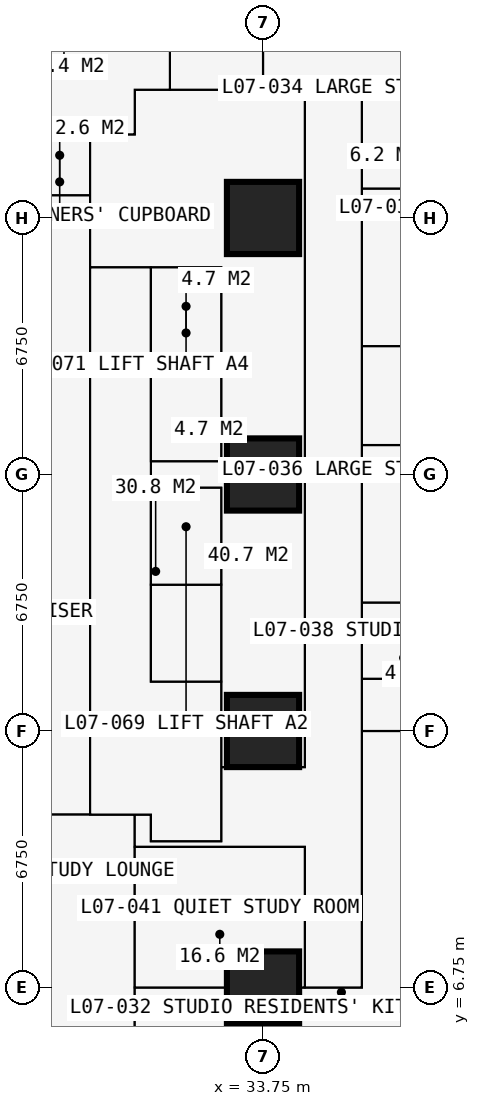
"""IFC4 building model, lengths in metres.
Left out: names, types, materials, properties, quantities, classifications, styles, units other than length and angle.
Written with IfcOpenShell. Run it as: python <this file> out.ifc"""

import sys

from ifc_helpers import new_model, si_unit, direction, frame, frame_2d, origin, origin_2d, place, context, subcontext, project, spatial, rectangle, extrude, element, fill, save


model = new_model("IFC4")
c1 = context("Model", 3, precision=1e-05, world=origin(), true_north=direction((0.0, 1.0)))
c2 = subcontext(c1, "Body", "Model", "MODEL_VIEW")
j1 = project(units=[si_unit("LENGTHUNIT", "METRE"), si_unit("PLANEANGLEUNIT", "RADIAN")], contexts=[c1])
p1 = place(None, origin())
s1 = spatial("IfcSite", under=j1, at=p1, CompositionType="ELEMENT")
p2 = place(p1, origin())
s2 = spatial("IfcBuilding", under=s1, at=p2, CompositionType="ELEMENT")
p3 = place(p2, frame((0.0, 0.0, 28.8)))
s3 = spatial("IfcBuildingStorey", under=s2, at=p3, CompositionType="ELEMENT", Elevation=28.8)
for number, where, z_axis, x_axis in (
    (1, (33.75, 6.75, 0.0), (0.0, 0.0, 1.0), (1.0, 0.0, 0.0)),
    (2, (33.75, 13.5, 0.0), (0.0, 0.0, 1.0), (1.0, 0.0, 0.0)),
    (3, (33.75, 20.25, 0.0), (0.0, 0.0, 1.0), (1.0, 0.0, 0.0)),
    (4, (33.75, 27.0, 0.0), (0.0, 0.0, 1.0), (1.0, 0.0, 0.0)),
):
    element("IfcColumn", number, at=place(p3, frame(where, z_axis=z_axis, x_axis=x_axis)), inside=s3, PredefinedType="COLUMN", context=c2, shape_type="SweptSolid", body=[
        extrude(rectangle(XDim=1.9, YDim=1.9, at=origin_2d()), origin(), (0.0, 0.0, 1.0), 3.6),
    ])
p4 = place(p3, frame((10.125, 11.3, 0.0), z_axis=(0.0, 0.0, 1.0), x_axis=(1.0, 0.0, 0.0)))
e5 = element("IfcWall", 5, at=p4, inside=s3, PredefinedType="PARTITIONING", context=c2, shape_type="SweptSolid", body=[
    extrude(rectangle(XDim=20.675, YDim=0.15, at=frame_2d((10.337, 0.0))), origin(), (0.0, 0.0, 1.0), 3.375),
])
p5 = place(p4, frame((1.775, 0.0, 0.0)))
e6 = element("IfcOpeningElement", 6, at=p5, cuts=e5, PredefinedType="OPENING", context=c2, shape_type="SweptSolid", body=[
    extrude(rectangle(XDim=1.0, YDim=2.2, at=frame_2d((0.5, 1.1))), frame((0.0, 0.085, 0.0), z_axis=(0.0, -1.0, 0.0), x_axis=(1.0, 0.0, 0.0)), (0.0, 0.0, 1.0), 0.17),
])
p6 = place(p4, frame((11.312, 0.0, 0.0)))
e7 = element("IfcOpeningElement", 7, at=p6, cuts=e5, PredefinedType="OPENING", context=c2, shape_type="SweptSolid", body=[
    extrude(rectangle(XDim=1.0, YDim=2.2, at=frame_2d((0.5, 1.1))), frame((0.0, 0.085, 0.0), z_axis=(0.0, -1.0, 0.0), x_axis=(1.0, 0.0, 0.0)), (0.0, 0.0, 1.0), 0.17),
])
p7 = place(p3, frame((11.3, 29.2, 0.0), z_axis=(0.0, 0.0, 1.0), x_axis=(1.0, 0.0, 0.0)))
e8 = element("IfcWall", 8, at=p7, inside=s3, PredefinedType="PARTITIONING", context=c2, shape_type="SweptSolid", body=[
    extrude(rectangle(XDim=19.075, YDim=0.15, at=frame_2d((9.538, 0.0))), origin(), (0.0, 0.0, 1.0), 3.375),
])
p8 = place(p7, frame((12.875, 0.0, 0.0)))
e9 = element("IfcOpeningElement", 9, at=p8, cuts=e8, PredefinedType="OPENING", context=c2, shape_type="SweptSolid", body=[
    extrude(rectangle(XDim=1.0, YDim=2.2, at=frame_2d((0.5, 1.1))), frame((0.0, 0.085, 0.0), z_axis=(0.0, -1.0, 0.0), x_axis=(1.0, 0.0, 0.0)), (0.0, 0.0, 1.0), 0.17),
])
p9 = place(p7, frame((10.438, 0.0, 0.0)))
e10 = element("IfcOpeningElement", 10, at=p9, cuts=e8, PredefinedType="OPENING", context=c2, shape_type="SweptSolid", body=[
    extrude(rectangle(XDim=1.0, YDim=2.2, at=frame_2d((0.5, 1.1))), frame((0.0, 0.085, 0.0), z_axis=(0.0, -1.0, 0.0), x_axis=(1.0, 0.0, 0.0)), (0.0, 0.0, 1.0), 0.17),
])
p10 = place(p7, frame((14.875, 0.0, 0.0)))
e11 = element("IfcOpeningElement", 11, at=p10, cuts=e8, PredefinedType="OPENING", context=c2, shape_type="SweptSolid", body=[
    extrude(rectangle(XDim=0.95, YDim=2.2, at=frame_2d((0.475, 1.1))), frame((0.0, 0.085, 0.0), z_axis=(0.0, -1.0, 0.0), x_axis=(1.0, 0.0, 0.0)), (0.0, 0.0, 1.0), 0.17),
])
p11 = place(p3, frame((27.6, 27.6, 0.0), z_axis=(0.0, 0.0, 1.0), x_axis=(1.0, 0.0, 0.0)))
e12 = element("IfcWall", 12, at=p11, inside=s3, PredefinedType="PARTITIONING", context=c2, shape_type="SweptSolid", body=[
    extrude(rectangle(XDim=1.6, YDim=0.15, at=frame_2d((0.8, 0.0))), origin(), (0.0, 0.0, 1.0), 2.877),
])
p12 = place(p3, frame((29.2, 11.3, 0.0), z_axis=(0.0, 0.0, 1.0), x_axis=(0.0, 1.0, 0.0)))
e13 = element("IfcWall", 13, at=p12, inside=s3, PredefinedType="PARTITIONING", context=c2, shape_type="SweptSolid", body=[
    extrude(rectangle(XDim=17.9, YDim=0.2, at=frame_2d((8.95, 0.0))), origin(), (0.0, 0.0, 1.0), 3.375),
])
p13 = place(p12, frame((8.35, 0.0, 0.0)))
e14 = element("IfcOpeningElement", 14, at=p13, cuts=e13, PredefinedType="OPENING", context=c2, shape_type="SweptSolid", body=[
    extrude(rectangle(XDim=1.2, YDim=2.2, at=frame_2d((0.6, 1.1))), frame((0.0, 0.11, 0.0), z_axis=(0.0, -1.0, 0.0), x_axis=(1.0, 0.0, 0.0)), (0.0, 0.0, 1.0), 0.22),
])
p14 = place(p3, frame((29.2, 25.7, 0.0), z_axis=(0.0, 0.0, 1.0), x_axis=(1.0, 0.0, 0.0)))
e15 = element("IfcWall", 15, at=p14, inside=s3, PredefinedType="SHEAR", context=c2, shape_type="SweptSolid", body=[
    extrude(rectangle(XDim=3.45, YDim=0.1, at=frame_2d((1.725, 0.0))), origin(), (0.0, 0.0, 1.0), 3.375),
])
p15 = place(p3, frame((30.375, -0.734, 0.0), z_axis=(0.0, 0.0, 1.0), x_axis=(0.0, 1.0, 0.0)))
e16 = element("IfcWall", 16, at=p15, inside=s3, PredefinedType="PARTITIONING", context=c2, shape_type="SweptSolid", body=[
    extrude(rectangle(XDim=12.034, YDim=0.15, at=frame_2d((6.017, 0.0))), origin(), (0.0, 0.0, 1.0), 3.375),
])
p16 = place(p15, frame((5.134, 0.0, 0.0)))
e17 = element("IfcOpeningElement", 17, at=p16, cuts=e16, PredefinedType="OPENING", context=c2, shape_type="SweptSolid", body=[
    extrude(rectangle(XDim=1.0, YDim=2.2, at=frame_2d((0.5, 1.1))), frame((0.0, 0.085, 0.0), z_axis=(0.0, -1.0, 0.0), x_axis=(1.0, 0.0, 0.0)), (0.0, 0.0, 1.0), 0.17),
])
p17 = place(p3, frame((30.375, 6.75, 0.0), z_axis=(0.0, 0.0, 1.0), x_axis=(1.0, 0.0, 0.0)))
e18 = element("IfcWall", 18, at=p17, inside=s3, PredefinedType="PARTITIONING", context=c2, shape_type="SweptSolid", body=[
    extrude(rectangle(XDim=5.975, YDim=0.15, at=frame_2d((2.988, 0.0))), origin(), (0.0, 0.0, 1.0), 2.877),
])
p18 = place(p3, frame((30.375, 10.45, 0.0), z_axis=(0.0, 0.0, 1.0), x_axis=(1.0, 0.0, 0.0)))
e19 = element("IfcWall", 19, at=p18, inside=s3, PredefinedType="PARTITIONING", context=c2, shape_type="SweptSolid", body=[
    extrude(rectangle(XDim=4.475, YDim=0.15, at=frame_2d((2.238, 0.0))), origin(), (0.0, 0.0, 1.0), 3.375),
])
p19 = place(p18, frame((2.35, 0.0, 0.0)))
e20 = element("IfcOpeningElement", 20, at=p19, cuts=e19, PredefinedType="OPENING", context=c2, shape_type="SweptSolid", body=[
    extrude(rectangle(XDim=0.95, YDim=2.2, at=frame_2d((0.475, 1.1))), frame((0.0, 0.085, 0.0), z_axis=(0.0, -1.0, 0.0), x_axis=(1.0, 0.0, 0.0)), (0.0, 0.0, 1.0), 0.17),
])
p20 = place(p3, frame((30.375, 29.2, 0.0), z_axis=(0.0, 0.0, 1.0), x_axis=(0.0, 1.0, 0.0)))
e21 = element("IfcWall", 21, at=p20, inside=s3, PredefinedType="PARTITIONING", context=c2, shape_type="SweptSolid", body=[
    extrude(rectangle(XDim=1.175, YDim=0.15, at=frame_2d((0.587, 0.0))), origin(), (0.0, 0.0, 1.0), 3.375),
])
p21 = place(p3, frame((30.375, 30.375, 0.0), z_axis=(0.0, 0.0, 1.0), x_axis=(1.0, 0.0, 0.0)))
e22 = element("IfcWall", 22, at=p21, inside=s3, PredefinedType="PARTITIONING", context=c2, shape_type="SweptSolid", body=[
    extrude(rectangle(XDim=10.859, YDim=0.15, at=frame_2d((5.429, 0.0))), origin(), (0.0, 0.0, 1.0), 3.375),
])
p22 = place(p3, frame((30.8, 10.6, 0.0), z_axis=(0.0, 0.0, 1.0), x_axis=(0.0, 1.0, 0.0)))
e23 = element("IfcWall", 23, at=p22, inside=s3, PredefinedType="PARTITIONING", context=c2, shape_type="SweptSolid", body=[
    extrude(rectangle(XDim=0.7, YDim=0.15, at=frame_2d((0.35, 0.0))), origin(), (0.0, 0.0, 1.0), 3.375),
])
p23 = place(p3, frame((30.8, 10.6, 0.0), z_axis=(0.0, 0.0, 1.0), x_axis=(1.0, 0.0, 0.0)))
e24 = element("IfcWall", 24, at=p23, inside=s3, PredefinedType="PARTITIONING", context=c2, shape_type="SweptSolid", body=[
    extrude(rectangle(XDim=1.85, YDim=0.15, at=frame_2d((0.925, 0.0))), origin(), (0.0, 0.0, 1.0), 3.375),
])
p24 = place(p3, frame((30.8, 14.8, 0.0), z_axis=(0.0, 0.0, 1.0), x_axis=(0.0, 1.0, 0.0)))
e25 = element("IfcWall", 25, at=p24, inside=s3, PredefinedType="PARTITIONING", context=c2, shape_type="SweptSolid", body=[
    extrude(rectangle(XDim=10.9, YDim=0.15, at=frame_2d((5.45, 0.0))), origin(), (0.0, 0.0, 1.0), 3.375),
])
p25 = place(p24, frame((0.75, 0.0, 0.0)))
e26 = element("IfcOpeningElement", 26, at=p25, cuts=e25, PredefinedType="OPENING", context=c2, shape_type="SweptSolid", body=[
    extrude(rectangle(XDim=1.1, YDim=2.2, at=frame_2d((0.55, 1.1))), frame((0.0, 0.085, 0.0), z_axis=(0.0, -1.0, 0.0), x_axis=(1.0, 0.0, 0.0)), (0.0, 0.0, 1.0), 0.17),
])
p26 = place(p24, frame((3.25, 0.0, 0.0)))
e27 = element("IfcOpeningElement", 27, at=p26, cuts=e25, PredefinedType="OPENING", context=c2, shape_type="SweptSolid", body=[
    extrude(rectangle(XDim=1.1, YDim=2.2, at=frame_2d((0.55, 1.1))), frame((0.0, 0.085, 0.0), z_axis=(0.0, -1.0, 0.0), x_axis=(1.0, 0.0, 0.0)), (0.0, 0.0, 1.0), 0.17),
])
p27 = place(p24, frame((6.5, 0.0, 0.0)))
e28 = element("IfcOpeningElement", 28, at=p27, cuts=e25, PredefinedType="OPENING", context=c2, shape_type="SweptSolid", body=[
    extrude(rectangle(XDim=1.1, YDim=2.2, at=frame_2d((0.55, 1.1))), frame((0.0, 0.085, 0.0), z_axis=(0.0, -1.0, 0.0), x_axis=(1.0, 0.0, 0.0)), (0.0, 0.0, 1.0), 0.17),
])
p28 = place(p24, frame((9.05, 0.0, 0.0)))
e29 = element("IfcOpeningElement", 29, at=p28, cuts=e25, PredefinedType="OPENING", context=c2, shape_type="SweptSolid", body=[
    extrude(rectangle(XDim=1.1, YDim=2.2, at=frame_2d((0.55, 1.1))), frame((0.0, 0.085, 0.0), z_axis=(0.0, -1.0, 0.0), x_axis=(1.0, 0.0, 0.0)), (0.0, 0.0, 1.0), 0.17),
])
for number, where, z_axis, x_axis in (
    (30, (30.8, 14.8, 0.0), (0.0, 0.0, 1.0), (1.0, 0.0, 0.0)),
    (31, (30.8, 17.35, 0.0), (0.0, 0.0, 1.0), (1.0, 0.0, 0.0)),
    (32, (30.8, 19.9, 0.0), (0.0, 0.0, 1.0), (1.0, 0.0, 0.0)),
    (33, (30.8, 20.6, 0.0), (0.0, 0.0, 1.0), (1.0, 0.0, 0.0)),
    (34, (30.8, 23.15, 0.0), (0.0, 0.0, 1.0), (1.0, 0.0, 0.0)),
):
    element("IfcWall", number, at=place(p3, frame(where, z_axis=z_axis, x_axis=x_axis)), inside=s3, PredefinedType="SHEAR", context=c2, shape_type="SweptSolid", body=[
        extrude(rectangle(XDim=1.85, YDim=0.1, at=frame_2d((0.925, 0.0))), origin(), (0.0, 0.0, 1.0), 3.375),
    ])
p29 = place(p3, frame((31.3, 30.375, 0.0), z_axis=(0.0, 0.0, 1.0), x_axis=(0.0, 1.0, 0.0)))
e35 = element("IfcWall", 35, at=p29, inside=s3, PredefinedType="PARTITIONING", context=c2, shape_type="SweptSolid", body=[
    extrude(rectangle(XDim=4.475, YDim=0.15, at=frame_2d((2.238, 0.0))), origin(), (0.0, 0.0, 1.0), 3.375),
])
p30 = place(p3, frame((32.65, 10.6, 0.0), z_axis=(0.0, 0.0, 1.0), x_axis=(0.0, 1.0, 0.0)))
e36 = element("IfcWall", 36, at=p30, inside=s3, PredefinedType="SHEAR", context=c2, shape_type="SweptSolid", body=[
    extrude(rectangle(XDim=9.3, YDim=0.1, at=frame_2d((4.65, 0.0))), origin(), (0.0, 0.0, 1.0), 3.375),
])
p31 = place(p30, frame((0.5, 0.0, 0.0)))
e37 = element("IfcOpeningElement", 37, at=p31, cuts=e36, PredefinedType="OPENING", context=c2, shape_type="SweptSolid", body=[
    extrude(rectangle(XDim=1.0, YDim=2.2, at=frame_2d((0.5, 1.1))), frame((0.0, 0.06, 0.0), z_axis=(0.0, -1.0, 0.0), x_axis=(1.0, 0.0, 0.0)), (0.0, 0.0, 1.0), 0.12),
])
p32 = place(p3, frame((32.65, 12.55, 0.0), z_axis=(0.0, 0.0, 1.0), x_axis=(1.0, 0.0, 0.0)))
e38 = element("IfcWall", 38, at=p32, inside=s3, PredefinedType="PARTITIONING", context=c2, shape_type="SweptSolid", body=[
    extrude(rectangle(XDim=2.2, YDim=0.15, at=frame_2d((1.1, 0.0))), origin(), (0.0, 0.0, 1.0), 3.375),
])
p33 = place(p3, frame((32.65, 20.6, 0.0), z_axis=(0.0, 0.0, 1.0), x_axis=(0.0, 1.0, 0.0)))
e39 = element("IfcWall", 39, at=p33, inside=s3, PredefinedType="PARTITIONING", context=c2, shape_type="SweptSolid", body=[
    extrude(rectangle(XDim=5.1, YDim=0.15, at=frame_2d((2.55, 0.0))), origin(), (0.0, 0.0, 1.0), 3.375),
])
p34 = place(p3, frame((33.75, 30.375, 0.0), z_axis=(0.0, 0.0, 1.0), x_axis=(0.0, 1.0, 0.0)))
e40 = element("IfcWall", 40, at=p34, inside=s3, PredefinedType="PARTITIONING", context=c2, shape_type="SweptSolid", body=[
    extrude(rectangle(XDim=10.859, YDim=0.15, at=frame_2d((5.429, 0.0))), origin(), (0.0, 0.0, 1.0), 2.877),
])
p35 = place(p34, frame((1.4, 0.0, 0.0)))
e41 = element("IfcOpeningElement", 41, at=p35, cuts=e40, PredefinedType="OPENING", context=c2, shape_type="SweptSolid", body=[
    extrude(rectangle(XDim=1.0, YDim=2.2, at=frame_2d((0.5, 1.1))), frame((0.0, 0.085, 0.0), z_axis=(0.0, -1.0, 0.0), x_axis=(1.0, 0.0, 0.0)), (0.0, 0.0, 1.0), 0.17),
])
p36 = place(p3, frame((34.85, 6.75, 0.0), z_axis=(0.0, 0.0, 1.0), x_axis=(0.0, 1.0, 0.0)))
e42 = element("IfcWall", 42, at=p36, inside=s3, PredefinedType="PARTITIONING", context=c2, shape_type="SweptSolid", body=[
    extrude(rectangle(XDim=3.7, YDim=0.15, at=frame_2d((1.85, 0.0))), origin(), (0.0, 0.0, 1.0), 3.375),
])
p37 = place(p3, frame((34.85, 12.55, 0.0), z_axis=(0.0, 0.0, 1.0), x_axis=(0.0, 1.0, 0.0)))
e43 = element("IfcWall", 43, at=p37, inside=s3, PredefinedType="PARTITIONING", context=c2, shape_type="SweptSolid", body=[
    extrude(rectangle(XDim=17.825, YDim=0.15, at=frame_2d((8.913, 0.0))), origin(), (0.0, 0.0, 1.0), 3.375),
])
p38 = place(p37, frame((8.65, 0.0, 0.0)))
e44 = element("IfcOpeningElement", 44, at=p38, cuts=e43, PredefinedType="OPENING", context=c2, shape_type="SweptSolid", body=[
    extrude(rectangle(XDim=0.95, YDim=2.2, at=frame_2d((0.475, 1.1))), frame((0.0, 0.085, 0.0), z_axis=(0.0, -1.0, 0.0), x_axis=(1.0, 0.0, 0.0)), (0.0, 0.0, 1.0), 0.17),
])
p39 = place(p3, frame((36.35, 6.75, 0.0), z_axis=(0.0, 0.0, 1.0), x_axis=(0.0, 1.0, 0.0)))
e45 = element("IfcWall", 45, at=p39, inside=s3, PredefinedType="PARTITIONING", context=c2, shape_type="SweptSolid", body=[
    extrude(rectangle(XDim=23.625, YDim=0.15, at=frame_2d((11.812, 0.0))), origin(), (0.0, 0.0, 1.0), 3.375),
])
p40 = place(p39, frame((18.475, 0.0, 0.0)))
e46 = element("IfcOpeningElement", 46, at=p40, cuts=e45, PredefinedType="OPENING", context=c2, shape_type="SweptSolid", body=[
    extrude(rectangle(XDim=0.95, YDim=2.2, at=frame_2d((0.475, 1.1))), frame((0.0, 0.085, 0.0), z_axis=(0.0, -1.0, 0.0), x_axis=(1.0, 0.0, 0.0)), (0.0, 0.0, 1.0), 0.17),
])
p41 = place(p39, frame((11.725, 0.0, 0.0)))
e47 = element("IfcOpeningElement", 47, at=p41, cuts=e45, PredefinedType="OPENING", context=c2, shape_type="SweptSolid", body=[
    extrude(rectangle(XDim=0.95, YDim=2.2, at=frame_2d((0.475, 1.1))), frame((0.0, 0.085, 0.0), z_axis=(0.0, -1.0, 0.0), x_axis=(1.0, 0.0, 0.0)), (0.0, 0.0, 1.0), 0.17),
])
p42 = place(p39, frame((6.95, 0.0, 0.0)))
e48 = element("IfcOpeningElement", 48, at=p42, cuts=e45, PredefinedType="OPENING", context=c2, shape_type="SweptSolid", body=[
    extrude(rectangle(XDim=0.95, YDim=2.2, at=frame_2d((0.475, 1.1))), frame((0.0, 0.085, 0.0), z_axis=(0.0, -1.0, 0.0), x_axis=(1.0, 0.0, 0.0)), (0.0, 0.0, 1.0), 0.17),
])
p43 = place(p3, frame((36.35, 13.5, 0.0), z_axis=(0.0, 0.0, 1.0), x_axis=(1.0, 0.0, 0.0)))
e49 = element("IfcWall", 49, at=p43, inside=s3, PredefinedType="PARTITIONING", context=c2, shape_type="SweptSolid", body=[
    extrude(rectangle(XDim=4.884, YDim=0.15, at=frame_2d((2.442, 0.0))), origin(), (0.0, 0.0, 1.0), 2.61),
])
p44 = place(p3, frame((36.35, 14.875, 0.0), z_axis=(0.0, 0.0, 1.0), x_axis=(1.0, 0.0, 0.0)))
e50 = element("IfcWall", 50, at=p44, inside=s3, PredefinedType="PARTITIONING", context=c2, shape_type="SweptSolid", body=[
    extrude(rectangle(XDim=2.2, YDim=0.1, at=frame_2d((1.1, 0.0))), origin(), (0.0, 0.0, 1.0), 3.375),
])
p45 = place(p3, frame((36.35, 16.875, 0.0), z_axis=(0.0, 0.0, 1.0), x_axis=(1.0, 0.0, 0.0)))
e51 = element("IfcWall", 51, at=p45, inside=s3, PredefinedType="PARTITIONING", context=c2, shape_type="SweptSolid", body=[
    extrude(rectangle(XDim=4.884, YDim=0.175, at=frame_2d((2.442, 0.0))), origin(), (0.0, 0.0, 1.0), 3.375),
])
p46 = place(p45, frame((0.65, 0.0, 0.0)))
e52 = element("IfcOpeningElement", 52, at=p46, cuts=e51, PredefinedType="OPENING", context=c2, shape_type="SweptSolid", body=[
    extrude(rectangle(XDim=0.9, YDim=2.2, at=frame_2d((0.45, 1.1))), frame((0.0, 0.097, 0.0), z_axis=(0.0, -1.0, 0.0), x_axis=(1.0, 0.0, 0.0)), (0.0, 0.0, 1.0), 0.195),
])
p47 = place(p3, frame((36.35, 21.025, 0.0), z_axis=(0.0, 0.0, 1.0), x_axis=(1.0, 0.0, 0.0)))
e53 = element("IfcWall", 53, at=p47, inside=s3, PredefinedType="PARTITIONING", context=c2, shape_type="SweptSolid", body=[
    extrude(rectangle(XDim=2.4, YDim=0.1, at=frame_2d((1.2, 0.0))), origin(), (0.0, 0.0, 1.0), 3.375),
])
p48 = place(p3, frame((36.35, 23.625, 0.0), z_axis=(0.0, 0.0, 1.0), x_axis=(1.0, 0.0, 0.0)))
e54 = element("IfcWall", 54, at=p48, inside=s3, PredefinedType="PARTITIONING", context=c2, shape_type="SweptSolid", body=[
    extrude(rectangle(XDim=4.884, YDim=0.175, at=frame_2d((2.442, 0.0))), origin(), (0.0, 0.0, 1.0), 3.375),
])
p49 = place(p48, frame((0.75, 0.0, 0.0)))
e55 = element("IfcOpeningElement", 55, at=p49, cuts=e54, PredefinedType="OPENING", context=c2, shape_type="SweptSolid", body=[
    extrude(rectangle(XDim=0.9, YDim=2.2, at=frame_2d((0.45, 1.1))), frame((0.0, 0.097, 0.0), z_axis=(0.0, -1.0, 0.0), x_axis=(1.0, 0.0, 0.0)), (0.0, 0.0, 1.0), 0.195),
])
p50 = place(p3, frame((36.35, 27.775, 0.0), z_axis=(0.0, 0.0, 1.0), x_axis=(1.0, 0.0, 0.0)))
e56 = element("IfcWall", 56, at=p50, inside=s3, PredefinedType="PARTITIONING", context=c2, shape_type="SweptSolid", body=[
    extrude(rectangle(XDim=2.4, YDim=0.1, at=frame_2d((1.2, 0.0))), origin(), (0.0, 0.0, 1.0), 3.375),
])
p51 = place(p40, origin())
e57 = element("IfcDoor", 57, at=p51, inside=s3, OperationType="SINGLE_SWING_LEFT", PredefinedType="DOOR", context=c2, shape_type="SweptSolid", body=[
    extrude(rectangle(XDim=0.95, YDim=2.2, at=frame_2d((0.475, 1.1))), frame((0.0, 0.025, 0.0), z_axis=(0.0, -1.0, 0.0), x_axis=(1.0, 0.0, 0.0)), (0.0, 0.0, 1.0), 0.05),
])
fill(e46, e57)
p52 = place(p41, origin())
e58 = element("IfcDoor", 58, at=p52, inside=s3, OperationType="SINGLE_SWING_LEFT", PredefinedType="DOOR", context=c2, shape_type="SweptSolid", body=[
    extrude(rectangle(XDim=0.95, YDim=2.2, at=frame_2d((0.475, 1.1))), frame((0.0, 0.025, 0.0), z_axis=(0.0, -1.0, 0.0), x_axis=(1.0, 0.0, 0.0)), (0.0, 0.0, 1.0), 0.05),
])
fill(e47, e58)
p53 = place(p49, origin())
e59 = element("IfcDoor", 59, at=p53, inside=s3, OperationType="SINGLE_SWING_RIGHT", PredefinedType="DOOR", context=c2, shape_type="SweptSolid", body=[
    extrude(rectangle(XDim=0.9, YDim=2.2, at=frame_2d((0.45, 1.1))), frame((0.0, 0.025, 0.0), z_axis=(0.0, -1.0, 0.0), x_axis=(1.0, 0.0, 0.0)), (0.0, 0.0, 1.0), 0.05),
])
fill(e55, e59)
p54 = place(p42, origin())
e60 = element("IfcDoor", 60, at=p54, inside=s3, OperationType="SINGLE_SWING_LEFT", PredefinedType="DOOR", context=c2, shape_type="SweptSolid", body=[
    extrude(rectangle(XDim=0.95, YDim=2.2, at=frame_2d((0.475, 1.1))), frame((0.0, 0.025, 0.0), z_axis=(0.0, -1.0, 0.0), x_axis=(1.0, 0.0, 0.0)), (0.0, 0.0, 1.0), 0.05),
])
fill(e48, e60)
p55 = place(p46, origin())
e61 = element("IfcDoor", 61, at=p55, inside=s3, OperationType="SINGLE_SWING_RIGHT", PredefinedType="DOOR", context=c2, shape_type="SweptSolid", body=[
    extrude(rectangle(XDim=0.9, YDim=2.2, at=frame_2d((0.45, 1.1))), frame((0.0, 0.025, 0.0), z_axis=(0.0, -1.0, 0.0), x_axis=(1.0, 0.0, 0.0)), (0.0, 0.0, 1.0), 0.05),
])
fill(e52, e61)
p56 = place(p31, origin())
e62 = element("IfcDoor", 62, at=p56, inside=s3, OperationType="SINGLE_SWING_LEFT", PredefinedType="DOOR", context=c2, shape_type="SweptSolid", body=[
    extrude(rectangle(XDim=1.0, YDim=2.2, at=frame_2d((0.5, 1.1))), frame((0.0, 0.025, 0.0), z_axis=(0.0, -1.0, 0.0), x_axis=(1.0, 0.0, 0.0)), (0.0, 0.0, 1.0), 0.05),
])
fill(e37, e62)
p57 = place(p38, origin())
e63 = element("IfcDoor", 63, at=p57, inside=s3, OperationType="SINGLE_SWING_LEFT", PredefinedType="DOOR", context=c2, shape_type="SweptSolid", body=[
    extrude(rectangle(XDim=0.95, YDim=2.2, at=frame_2d((0.475, 1.1))), frame((0.0, 0.025, 0.0), z_axis=(0.0, -1.0, 0.0), x_axis=(1.0, 0.0, 0.0)), (0.0, 0.0, 1.0), 0.05),
])
fill(e44, e63)
p58 = place(p19, origin())
e64 = element("IfcDoor", 64, at=p58, inside=s3, OperationType="SINGLE_SWING_LEFT", PredefinedType="DOOR", context=c2, shape_type="SweptSolid", body=[
    extrude(rectangle(XDim=0.95, YDim=2.2, at=frame_2d((0.475, 1.1))), frame((0.0, 0.025, 0.0), z_axis=(0.0, -1.0, 0.0), x_axis=(1.0, 0.0, 0.0)), (0.0, 0.0, 1.0), 0.05),
])
fill(e20, e64)
p59 = place(p25, origin())
e65 = element("IfcDoor", 65, at=p59, inside=s3, OperationType="DOUBLE_DOOR_SLIDING", PredefinedType="DOOR", context=c2, shape_type="SweptSolid", body=[
    extrude(rectangle(XDim=1.1, YDim=2.2, at=frame_2d((0.55, 1.1))), frame((0.0, 0.025, 0.0), z_axis=(0.0, -1.0, 0.0), x_axis=(1.0, 0.0, 0.0)), (0.0, 0.0, 1.0), 0.05),
])
fill(e26, e65)
p60 = place(p26, origin())
e66 = element("IfcDoor", 66, at=p60, inside=s3, OperationType="DOUBLE_DOOR_SLIDING", PredefinedType="DOOR", context=c2, shape_type="SweptSolid", body=[
    extrude(rectangle(XDim=1.1, YDim=2.2, at=frame_2d((0.55, 1.1))), frame((0.0, 0.025, 0.0), z_axis=(0.0, -1.0, 0.0), x_axis=(1.0, 0.0, 0.0)), (0.0, 0.0, 1.0), 0.05),
])
fill(e27, e66)
p61 = place(p27, origin())
e67 = element("IfcDoor", 67, at=p61, inside=s3, OperationType="DOUBLE_DOOR_SLIDING", PredefinedType="DOOR", context=c2, shape_type="SweptSolid", body=[
    extrude(rectangle(XDim=1.1, YDim=2.2, at=frame_2d((0.55, 1.1))), frame((0.0, 0.025, 0.0), z_axis=(0.0, -1.0, 0.0), x_axis=(1.0, 0.0, 0.0)), (0.0, 0.0, 1.0), 0.05),
])
fill(e28, e67)
p62 = place(p28, origin())
e68 = element("IfcDoor", 68, at=p62, inside=s3, OperationType="DOUBLE_DOOR_SLIDING", PredefinedType="DOOR", context=c2, shape_type="SweptSolid", body=[
    extrude(rectangle(XDim=1.1, YDim=2.2, at=frame_2d((0.55, 1.1))), frame((0.0, 0.025, 0.0), z_axis=(0.0, -1.0, 0.0), x_axis=(1.0, 0.0, 0.0)), (0.0, 0.0, 1.0), 0.05),
])
fill(e29, e68)
p63 = place(p13, origin())
e69 = element("IfcDoor", 69, at=p63, inside=s3, OperationType="DOUBLE_DOOR_SINGLE_SWING", PredefinedType="DOOR", context=c2, shape_type="SweptSolid", body=[
    extrude(rectangle(XDim=1.2, YDim=2.2, at=frame_2d((0.6, 1.1))), frame((0.0, 0.025, 0.0), z_axis=(0.0, -1.0, 0.0), x_axis=(1.0, 0.0, 0.0)), (0.0, 0.0, 1.0), 0.05),
])
fill(e14, e69)
save(model, sys.argv[1])
